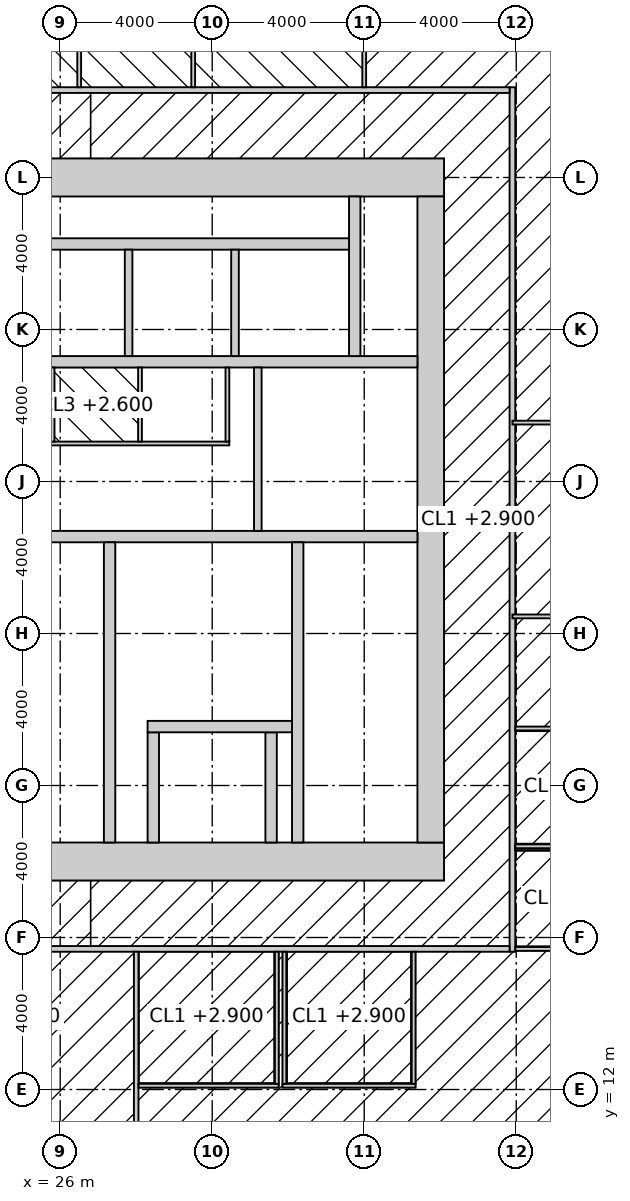
"""IFC4 building model, lengths in metres.
Left out: names, types, materials, properties, quantities, classifications, styles, units other than length and angle.
Written with IfcOpenShell. Run it as: python <this file> out.ifc"""

import sys

from ifc_helpers import new_model, si_unit, direction, frame, frame_2d, origin, place, context, subcontext, project, spatial, rectangle, extrude, element, fill, save


model = new_model("IFC4")
c1 = context("Model", 3, precision=1e-05, world=origin(), true_north=direction((0.0, 1.0)))
c2 = subcontext(c1, "Body", "Model", "MODEL_VIEW")
j1 = project(units=[si_unit("LENGTHUNIT", "METRE"), si_unit("PLANEANGLEUNIT", "RADIAN")], contexts=[c1])
p1 = place(None, origin())
s1 = spatial("IfcSite", under=j1, at=p1, CompositionType="ELEMENT")
p2 = place(p1, origin())
s2 = spatial("IfcBuilding", under=s1, at=p2, CompositionType="ELEMENT")
p3 = place(p2, frame((0.0, 0.0, 179.8)))
s3 = spatial("IfcBuildingStorey", under=s2, at=p3, CompositionType="ELEMENT", Elevation=179.8)
p4 = place(p3, frame((18.5, 18.0, -0.15), z_axis=(0.0, 0.0, 1.0), x_axis=(1.0, 0.0, 0.0)))
e1 = element("IfcWall", 1, at=p4, inside=s3, PredefinedType="SHEAR", context=c2, shape_type="SweptSolid", body=[
    extrude(rectangle(XDim=17.6, YDim=1.0, at=frame_2d((8.8, 0.0))), origin(), (0.0, 0.0, 1.0), 4.0),
])
p5 = place(p4, frame((3.45, 0.0, 0.15)))
e2 = element("IfcOpeningElement", 2, at=p5, cuts=e1, PredefinedType="OPENING", context=c2, shape_type="SweptSolid", body=[
    extrude(rectangle(XDim=1.5, YDim=2.4, at=frame_2d((0.75, 1.2))), frame((0.0, 0.51, 0.0), z_axis=(0.0, -1.0, 0.0), x_axis=(1.0, 0.0, 0.0)), (0.0, 0.0, 1.0), 1.02),
])
p6 = place(p3, frame((18.5, 36.0, -0.15), z_axis=(0.0, 0.0, 1.0), x_axis=(1.0, 0.0, 0.0)))
e3 = element("IfcWall", 3, at=p6, inside=s3, PredefinedType="SHEAR", context=c2, shape_type="SweptSolid", body=[
    extrude(rectangle(XDim=17.6, YDim=1.0, at=frame_2d((8.8, 0.0))), origin(), (0.0, 0.0, 1.0), 4.0),
])
p7 = place(p3, frame((35.75, 18.5, -0.15), z_axis=(0.0, 0.0, 1.0), x_axis=(0.0, 1.0, 0.0)))
e4 = element("IfcWall", 4, at=p7, inside=s3, PredefinedType="SHEAR", context=c2, shape_type="SweptSolid", body=[
    extrude(rectangle(XDim=17.0, YDim=0.7, at=frame_2d((8.5, 0.0))), origin(), (0.0, 0.0, 1.0), 4.0),
])
p8 = place(p7, frame((9.85, 0.0, 0.15)))
e5 = element("IfcOpeningElement", 5, at=p8, cuts=e4, PredefinedType="OPENING", context=c2, shape_type="SweptSolid", body=[
    extrude(rectangle(XDim=1.0, YDim=2.2, at=frame_2d((0.5, 1.1))), frame((0.0, 0.36, 0.0), z_axis=(0.0, -1.0, 0.0), x_axis=(1.0, 0.0, 0.0)), (0.0, 0.0, 1.0), 0.72),
])
p9 = place(p3, frame((24.15, 26.55, -0.15), z_axis=(0.0, 0.0, 1.0), x_axis=(1.0, 0.0, 0.0)))
e6 = element("IfcWall", 6, at=p9, inside=s3, PredefinedType="SHEAR", context=c2, shape_type="SweptSolid", body=[
    extrude(rectangle(XDim=11.25, YDim=0.3, at=frame_2d((5.625, 0.0))), origin(), (0.0, 0.0, 1.0), 4.0),
])
p10 = place(p9, frame((9.25, 0.0, 0.15)))
e7 = element("IfcOpeningElement", 7, at=p10, cuts=e6, PredefinedType="OPENING", context=c2, shape_type="SweptSolid", body=[
    extrude(rectangle(XDim=1.0, YDim=2.2, at=frame_2d((0.5, 1.1))), frame((0.0, 0.16, 0.0), z_axis=(0.0, -1.0, 0.0), x_axis=(1.0, 0.0, 0.0)), (0.0, 0.0, 1.0), 0.32),
])
p11 = place(p9, frame((4.9, 0.0, 0.15)))
e8 = element("IfcOpeningElement", 8, at=p11, cuts=e6, PredefinedType="OPENING", context=c2, shape_type="SweptSolid", body=[
    extrude(rectangle(XDim=1.5, YDim=2.4, at=frame_2d((0.75, 1.2))), frame((0.0, 0.16, 0.0), z_axis=(0.0, -1.0, 0.0), x_axis=(1.0, 0.0, 0.0)), (0.0, 0.0, 1.0), 0.32),
])
p12 = place(p3, frame((27.3, 18.5, -0.15), z_axis=(0.0, 0.0, 1.0), x_axis=(0.0, 1.0, 0.0)))
e9 = element("IfcWall", 9, at=p12, inside=s3, PredefinedType="SHEAR", context=c2, shape_type="SweptSolid", body=[
    extrude(rectangle(XDim=7.9, YDim=0.3, at=frame_2d((3.95, 0.0))), origin(), (0.0, 0.0, 1.0), 4.0),
])
p13 = place(p12, frame((6.4, 0.0, 0.15)))
e10 = element("IfcOpeningElement", 10, at=p13, cuts=e9, PredefinedType="OPENING", context=c2, shape_type="SweptSolid", body=[
    extrude(rectangle(XDim=1.0, YDim=2.2, at=frame_2d((0.5, 1.1))), frame((0.0, 0.16, 0.0), z_axis=(0.0, -1.0, 0.0), x_axis=(1.0, 0.0, 0.0)), (0.0, 0.0, 1.0), 0.32),
])
p14 = place(p3, frame((32.25, 18.5, -0.15), z_axis=(0.0, 0.0, 1.0), x_axis=(0.0, 1.0, 0.0)))
e11 = element("IfcWall", 11, at=p14, inside=s3, PredefinedType="SHEAR", context=c2, shape_type="SweptSolid", body=[
    extrude(rectangle(XDim=7.9, YDim=0.3, at=frame_2d((3.95, 0.0))), origin(), (0.0, 0.0, 1.0), 4.0),
])
for number, where, z_axis, x_axis in (
    (12, (28.45, 18.5, -0.15), (0.0, 0.0, 1.0), (0.0, 1.0, 0.0)),
    (13, (31.55, 18.5, -0.15), (0.0, 0.0, 1.0), (0.0, 1.0, 0.0)),
):
    element("IfcWall", number, at=place(p3, frame(where, z_axis=z_axis, x_axis=x_axis)), inside=s3, PredefinedType="SHEAR", context=c2, shape_type="SweptSolid", body=[
        extrude(rectangle(XDim=2.9, YDim=0.3, at=frame_2d((1.45, 0.0))), origin(), (0.0, 0.0, 1.0), 4.0),
    ])
p15 = place(p3, frame((28.3, 21.55, -0.15), z_axis=(0.0, 0.0, 1.0), x_axis=(1.0, 0.0, 0.0)))
e14 = element("IfcWall", 14, at=p15, inside=s3, PredefinedType="SHEAR", context=c2, shape_type="SweptSolid", body=[
    extrude(rectangle(XDim=3.8, YDim=0.3, at=frame_2d((1.9, 0.0))), origin(), (0.0, 0.0, 1.0), 4.0),
])
p16 = place(p15, frame((1.05, 0.0, 0.15)))
e15 = element("IfcOpeningElement", 15, at=p16, cuts=e14, PredefinedType="OPENING", context=c2, shape_type="SweptSolid", body=[
    extrude(rectangle(XDim=1.3, YDim=2.4, at=frame_2d((0.65, 1.2))), frame((0.0, 0.16, 0.0), z_axis=(0.0, -1.0, 0.0), x_axis=(1.0, 0.0, 0.0)), (0.0, 0.0, 1.0), 0.32),
])
p17 = place(p3, frame((24.15, 31.15, -0.15), z_axis=(0.0, 0.0, 1.0), x_axis=(1.0, 0.0, 0.0)))
e16 = element("IfcWall", 16, at=p17, inside=s3, PredefinedType="SHEAR", context=c2, shape_type="SweptSolid", body=[
    extrude(rectangle(XDim=11.25, YDim=0.3, at=frame_2d((5.625, 0.0))), origin(), (0.0, 0.0, 1.0), 4.0),
])
p18 = place(p17, frame((7.25, 0.0, 0.15)))
e17 = element("IfcOpeningElement", 17, at=p18, cuts=e16, PredefinedType="OPENING", context=c2, shape_type="SweptSolid", body=[
    extrude(rectangle(XDim=1.4, YDim=2.4, at=frame_2d((0.7, 1.2))), frame((0.0, 0.16, 0.0), z_axis=(0.0, -1.0, 0.0), x_axis=(1.0, 0.0, 0.0)), (0.0, 0.0, 1.0), 0.32),
])
p19 = place(p3, frame((33.75, 31.3, -0.15), z_axis=(0.0, 0.0, 1.0), x_axis=(0.0, 1.0, 0.0)))
e18 = element("IfcWall", 18, at=p19, inside=s3, PredefinedType="SHEAR", context=c2, shape_type="SweptSolid", body=[
    extrude(rectangle(XDim=4.2, YDim=0.3, at=frame_2d((2.1, 0.0))), origin(), (0.0, 0.0, 1.0), 4.0),
])
p20 = place(p3, frame((25.0, 34.25, -0.15), z_axis=(0.0, 0.0, 1.0), x_axis=(1.0, 0.0, 0.0)))
e19 = element("IfcWall", 19, at=p20, inside=s3, PredefinedType="SHEAR", context=c2, shape_type="SweptSolid", body=[
    extrude(rectangle(XDim=8.6, YDim=0.3, at=frame_2d((4.3, 0.0))), origin(), (0.0, 0.0, 1.0), 4.0),
])
for number, where, z_axis, x_axis in (
    (20, (27.8, 31.3, -0.15), (0.0, 0.0, 1.0), (0.0, 1.0, 0.0)),
    (21, (30.6, 31.3, -0.15), (0.0, 0.0, 1.0), (0.0, 1.0, 0.0)),
):
    element("IfcWall", number, at=place(p3, frame(where, z_axis=z_axis, x_axis=x_axis)), inside=s3, PredefinedType="SOLIDWALL", context=c2, shape_type="SweptSolid", body=[
        extrude(rectangle(XDim=2.8, YDim=0.2, at=frame_2d((1.4, 0.0))), origin(), (0.0, 0.0, 1.0), 4.0),
    ])
p21 = place(p3, frame((31.2, 26.7, 0.0), z_axis=(0.0, 0.0, 1.0), x_axis=(0.0, 1.0, 0.0)))
e22 = element("IfcWall", 22, at=p21, inside=s3, PredefinedType="SOLIDWALL", context=c2, shape_type="SweptSolid", body=[
    extrude(rectangle(XDim=4.3, YDim=0.2, at=frame_2d((2.15, 0.0))), origin(), (0.0, 0.0, 1.0), 3.85),
])
p22 = place(p3, frame((25.75, 29.0, 0.0), z_axis=(0.0, 0.0, 1.0), x_axis=(1.0, 0.0, 0.0)))
e23 = element("IfcWall", 23, at=p22, inside=s3, PredefinedType="PARTITIONING", context=c2, shape_type="SweptSolid", body=[
    extrude(rectangle(XDim=4.7, YDim=0.1, at=frame_2d((2.35, 0.0))), origin(), (0.0, 0.0, 1.0), 3.85),
])
p23 = place(p22, frame((0.7, 0.0, 0.0)))
e24 = element("IfcOpeningElement", 24, at=p23, cuts=e23, PredefinedType="OPENING", context=c2, shape_type="SweptSolid", body=[
    extrude(rectangle(XDim=1.0, YDim=2.2, at=frame_2d((0.5, 1.1))), frame((0.0, 0.06, 0.0), z_axis=(0.0, -1.0, 0.0), x_axis=(1.0, 0.0, 0.0)), (0.0, 0.0, 1.0), 0.12),
])
p24 = place(p22, frame((3.0, 0.0, 0.0)))
e25 = element("IfcOpeningElement", 25, at=p24, cuts=e23, PredefinedType="OPENING", context=c2, shape_type="SweptSolid", body=[
    extrude(rectangle(XDim=1.0, YDim=2.2, at=frame_2d((0.5, 1.1))), frame((0.0, 0.06, 0.0), z_axis=(0.0, -1.0, 0.0), x_axis=(1.0, 0.0, 0.0)), (0.0, 0.0, 1.0), 0.12),
])
for number, where, z_axis, x_axis in (
    (26, (25.8, 29.05, 0.0), (0.0, 0.0, 1.0), (0.0, 1.0, 0.0)),
    (27, (30.4, 29.05, 0.0), (0.0, 0.0, 1.0), (0.0, 1.0, 0.0)),
    (28, (28.1, 29.05, 0.0), (0.0, 0.0, 1.0), (0.0, 1.0, 0.0)),
):
    element("IfcWall", number, at=place(p3, frame(where, z_axis=z_axis, x_axis=x_axis)), inside=s3, PredefinedType="PARTITIONING", context=c2, shape_type="SweptSolid", body=[
        extrude(rectangle(XDim=1.95, YDim=0.1, at=frame_2d((0.975, 0.0))), origin(), (0.0, 0.0, 1.0), 3.85),
    ])
p25 = place(p3, frame((37.9, 15.625, 0.0), z_axis=(0.0, 0.0, 1.0), x_axis=(0.0, 1.0, 0.0)))
e29 = element("IfcWall", 29, at=p25, inside=s3, PredefinedType="PARTITIONING", context=c2, shape_type="SweptSolid", body=[
    extrude(rectangle(XDim=22.75, YDim=0.15, at=frame_2d((11.375, 0.0))), origin(), (0.0, 0.0, 1.0), 2.95),
])
p26 = place(p25, frame((10.475, 0.0, 0.0)))
e30 = element("IfcOpeningElement", 30, at=p26, cuts=e29, PredefinedType="OPENING", context=c2, shape_type="SweptSolid", body=[
    extrude(rectangle(XDim=1.8, YDim=2.4, at=frame_2d((0.9, 1.2))), frame((0.0, 0.085, 0.0), z_axis=(0.0, -1.0, 0.0), x_axis=(1.0, 0.0, 0.0)), (0.0, 0.0, 1.0), 0.17),
])
p27 = place(p3, frame((15.175, 15.7, 0.0), z_axis=(0.0, 0.0, 1.0), x_axis=(1.0, 0.0, 0.0)))
e31 = element("IfcWall", 31, at=p27, inside=s3, PredefinedType="PARTITIONING", context=c2, shape_type="SweptSolid", body=[
    extrude(rectangle(XDim=22.65, YDim=0.15, at=frame_2d((11.325, 0.0))), origin(), (0.0, 0.0, 1.0), 3.85),
])
p28 = place(p3, frame((15.175, 38.3, 0.0), z_axis=(0.0, 0.0, 1.0), x_axis=(1.0, 0.0, 0.0)))
e32 = element("IfcWall", 32, at=p28, inside=s3, PredefinedType="PARTITIONING", context=c2, shape_type="SweptSolid", body=[
    extrude(rectangle(XDim=22.65, YDim=0.15, at=frame_2d((11.325, 0.0))), origin(), (0.0, 0.0, 1.0), 3.85),
])
p29 = place(p28, frame((8.575, 0.0, 0.0)))
e33 = element("IfcOpeningElement", 33, at=p29, cuts=e32, PredefinedType="OPENING", context=c2, shape_type="SweptSolid", body=[
    extrude(rectangle(XDim=0.9, YDim=2.1, at=frame_2d((0.45, 1.05))), frame((0.0, 0.085, 0.0), z_axis=(0.0, -1.0, 0.0), x_axis=(1.0, 0.0, 0.0)), (0.0, 0.0, 1.0), 0.17),
])
p30 = place(p28, frame((12.325, 0.0, 0.0)))
e34 = element("IfcOpeningElement", 34, at=p30, cuts=e32, PredefinedType="OPENING", context=c2, shape_type="SweptSolid", body=[
    extrude(rectangle(XDim=1.0, YDim=2.1, at=frame_2d((0.5, 1.05))), frame((0.0, 0.085, 0.0), z_axis=(0.0, -1.0, 0.0), x_axis=(1.0, 0.0, 0.0)), (0.0, 0.0, 1.0), 0.17),
])
p31 = place(p28, frame((16.175, 0.0, 0.0)))
e35 = element("IfcOpeningElement", 35, at=p31, cuts=e32, PredefinedType="OPENING", context=c2, shape_type="SweptSolid", body=[
    extrude(rectangle(XDim=0.9, YDim=2.1, at=frame_2d((0.45, 1.05))), frame((0.0, 0.085, 0.0), z_axis=(0.0, -1.0, 0.0), x_axis=(1.0, 0.0, 0.0)), (0.0, 0.0, 1.0), 0.17),
])
p32 = place(p3, frame((34.0, 38.375, 0.0), z_axis=(0.0, 0.0, 1.0), x_axis=(0.0, 1.0, 0.0)))
e36 = element("IfcWall", 36, at=p32, inside=s3, PredefinedType="PARTITIONING", context=c2, shape_type="SweptSolid", body=[
    extrude(rectangle(XDim=3.675, YDim=0.1, at=frame_2d((1.837, 0.0))), origin(), (0.0, 0.0, 1.0), 2.95),
])
for number, where, z_axis, x_axis in (
    (37, (26.5, 38.375, 0.0), (0.0, 0.0, 1.0), (0.0, 1.0, 0.0)),
    (38, (29.5, 38.375, 0.0), (0.0, 0.0, 1.0), (0.0, 1.0, 0.0)),
):
    element("IfcWall", number, at=place(p3, frame(where, z_axis=z_axis, x_axis=x_axis)), inside=s3, PredefinedType="PARTITIONING", context=c2, shape_type="SweptSolid", body=[
        extrude(rectangle(XDim=3.575, YDim=0.1, at=frame_2d((1.788, 0.0))), origin(), (0.0, 0.0, 1.0), 3.85),
    ])
p33 = place(p3, frame((28.0, 8.3, 0.0), z_axis=(0.0, 0.0, 1.0), x_axis=(0.0, 1.0, 0.0)))
e39 = element("IfcWall", 39, at=p33, inside=s3, PredefinedType="PARTITIONING", context=c2, shape_type="SweptSolid", body=[
    extrude(rectangle(XDim=7.325, YDim=0.12, at=frame_2d((3.663, 0.0))), origin(), (0.0, 0.0, 1.0), 3.85),
])
p34 = place(p3, frame((28.06, 12.1, 0.0), z_axis=(0.0, 0.0, 1.0), x_axis=(1.0, 0.0, 0.0)))
e40 = element("IfcWall", 40, at=p34, inside=s3, PredefinedType="PARTITIONING", context=c2, shape_type="SweptSolid", body=[
    extrude(rectangle(XDim=3.69, YDim=0.1, at=frame_2d((1.845, 0.0))), origin(), (0.0, 0.0, 1.0), 3.85),
])
p35 = place(p34, frame((1.29, 0.0, 0.0)))
e41 = element("IfcOpeningElement", 41, at=p35, cuts=e40, PredefinedType="OPENING", context=c2, shape_type="SweptSolid", body=[
    extrude(rectangle(XDim=1.0, YDim=2.2, at=frame_2d((0.5, 1.1))), frame((0.0, 0.06, 0.0), z_axis=(0.0, -1.0, 0.0), x_axis=(1.0, 0.0, 0.0)), (0.0, 0.0, 1.0), 0.12),
])
p36 = place(p3, frame((31.85, 12.1, 0.0), z_axis=(0.0, 0.0, 1.0), x_axis=(1.0, 0.0, 0.0)))
e42 = element("IfcWall", 42, at=p36, inside=s3, PredefinedType="PARTITIONING", context=c2, shape_type="SweptSolid", body=[
    extrude(rectangle(XDim=3.5, YDim=0.1, at=frame_2d((1.75, 0.0))), origin(), (0.0, 0.0, 1.0), 3.85),
])
p37 = place(p36, frame((1.25, 0.0, 0.0)))
e43 = element("IfcOpeningElement", 43, at=p37, cuts=e42, PredefinedType="OPENING", context=c2, shape_type="SweptSolid", body=[
    extrude(rectangle(XDim=1.0, YDim=2.2, at=frame_2d((0.5, 1.1))), frame((0.0, 0.06, 0.0), z_axis=(0.0, -1.0, 0.0), x_axis=(1.0, 0.0, 0.0)), (0.0, 0.0, 1.0), 0.12),
])
for number, where, z_axis, x_axis in (
    (44, (37.975, 15.7, 0.0), (0.0, 0.0, 1.0), (1.0, 0.0, 0.0)),
    (45, (37.975, 18.35, 0.0), (0.0, 0.0, 1.0), (1.0, 0.0, 0.0)),
    (46, (37.975, 18.4, 0.0), (0.0, 0.0, 1.0), (1.0, 0.0, 0.0)),
    (47, (37.975, 21.5, 0.0), (0.0, 0.0, 1.0), (1.0, 0.0, 0.0)),
):
    element("IfcWall", number, at=place(p3, frame(where, z_axis=z_axis, x_axis=x_axis)), inside=s3, PredefinedType="PARTITIONING", context=c2, shape_type="SweptSolid", body=[
        extrude(rectangle(XDim=3.575, YDim=0.1, at=frame_2d((1.788, 0.0))), origin(), (0.0, 0.0, 1.0), 3.85),
    ])
for number, where, z_axis, x_axis in (
    (48, (31.7, 12.15, 0.0), (0.0, 0.0, 1.0), (0.0, 1.0, 0.0)),
    (49, (31.9, 12.15, 0.0), (0.0, 0.0, 1.0), (0.0, 1.0, 0.0)),
    (50, (35.3, 12.15, 0.0), (0.0, 0.0, 1.0), (0.0, 1.0, 0.0)),
):
    element("IfcWall", number, at=place(p3, frame(where, z_axis=z_axis, x_axis=x_axis)), inside=s3, PredefinedType="PARTITIONING", context=c2, shape_type="SweptSolid", body=[
        extrude(rectangle(XDim=3.475, YDim=0.1, at=frame_2d((1.738, 0.0))), origin(), (0.0, 0.0, 1.0), 3.85),
    ])
for number, where, z_axis, x_axis in (
    (51, (37.9, 24.45, 0.0), (0.0, 0.0, 1.0), (1.0, 0.0, 0.0)),
    (52, (42.4, 29.55, 0.0), (0.0, 0.0, 1.0), (-1.0, 0.0, 0.0)),
):
    element("IfcWall", number, at=place(p3, frame(where, z_axis=z_axis, x_axis=x_axis)), inside=s3, PredefinedType="PARTITIONING", context=c2, shape_type="SweptSolid", body=[
        extrude(rectangle(XDim=4.5, YDim=0.1, at=frame_2d((2.25, 0.0))), origin(), (0.0, 0.0, 1.0), 3.85),
    ])
p38 = place(p13, origin())
e53 = element("IfcDoor", 53, at=p38, inside=s3, OperationType="SINGLE_SWING_RIGHT", PredefinedType="DOOR", context=c2, shape_type="SweptSolid", body=[
    extrude(rectangle(XDim=1.0, YDim=2.2, at=frame_2d((0.5, 1.1))), frame((0.0, 0.025, 0.0), z_axis=(0.0, -1.0, 0.0), x_axis=(1.0, 0.0, 0.0)), (0.0, 0.0, 1.0), 0.05),
])
fill(e10, e53)
p39 = place(p10, frame((1.0, 0.0, 0.0), z_axis=(0.0, 0.0, 1.0), x_axis=(-1.0, 0.0, 0.0)))
e54 = element("IfcDoor", 54, at=p39, inside=s3, OperationType="SINGLE_SWING_RIGHT", PredefinedType="DOOR", context=c2, shape_type="SweptSolid", body=[
    extrude(rectangle(XDim=1.0, YDim=2.2, at=frame_2d((0.5, 1.1))), frame((0.0, 0.025, 0.0), z_axis=(0.0, -1.0, 0.0), x_axis=(1.0, 0.0, 0.0)), (0.0, 0.0, 1.0), 0.05),
])
fill(e7, e54)
p40 = place(p8, origin())
e55 = element("IfcDoor", 55, at=p40, inside=s3, OperationType="SINGLE_SWING_RIGHT", PredefinedType="DOOR", context=c2, shape_type="SweptSolid", body=[
    extrude(rectangle(XDim=1.0, YDim=2.2, at=frame_2d((0.5, 1.1))), frame((0.0, 0.025, 0.0), z_axis=(0.0, -1.0, 0.0), x_axis=(1.0, 0.0, 0.0)), (0.0, 0.0, 1.0), 0.05),
])
fill(e5, e55)
p41 = place(p11, origin())
e56 = element("IfcDoor", 56, at=p41, inside=s3, OperationType="DOUBLE_DOOR_DOUBLE_SWING", PredefinedType="DOOR", context=c2, shape_type="SweptSolid", body=[
    extrude(rectangle(XDim=1.5, YDim=2.4, at=frame_2d((0.75, 1.2))), frame((0.0, 0.025, 0.0), z_axis=(0.0, -1.0, 0.0), x_axis=(1.0, 0.0, 0.0)), (0.0, 0.0, 1.0), 0.05),
])
fill(e8, e56)
p42 = place(p23, origin())
e57 = element("IfcDoor", 57, at=p42, inside=s3, OperationType="SINGLE_SWING_LEFT", PredefinedType="DOOR", context=c2, shape_type="SweptSolid", body=[
    extrude(rectangle(XDim=1.0, YDim=2.2, at=frame_2d((0.5, 1.1))), frame((0.0, 0.025, 0.0), z_axis=(0.0, -1.0, 0.0), x_axis=(1.0, 0.0, 0.0)), (0.0, 0.0, 1.0), 0.05),
])
fill(e24, e57)
p43 = place(p24, origin())
e58 = element("IfcDoor", 58, at=p43, inside=s3, OperationType="SINGLE_SWING_LEFT", PredefinedType="DOOR", context=c2, shape_type="SweptSolid", body=[
    extrude(rectangle(XDim=1.0, YDim=2.2, at=frame_2d((0.5, 1.1))), frame((0.0, 0.025, 0.0), z_axis=(0.0, -1.0, 0.0), x_axis=(1.0, 0.0, 0.0)), (0.0, 0.0, 1.0), 0.05),
])
fill(e25, e58)
p44 = place(p30, origin())
e59 = element("IfcDoor", 59, at=p44, inside=s3, OperationType="SLIDING_TO_LEFT", PredefinedType="DOOR", context=c2, shape_type="SweptSolid", body=[
    extrude(rectangle(XDim=1.0, YDim=2.1, at=frame_2d((0.5, 1.05))), frame((0.0, 0.025, 0.0), z_axis=(0.0, -1.0, 0.0), x_axis=(1.0, 0.0, 0.0)), (0.0, 0.0, 1.0), 0.05),
])
fill(e34, e59)
p45 = place(p31, origin())
e60 = element("IfcDoor", 60, at=p45, inside=s3, OperationType="SINGLE_SWING_LEFT", PredefinedType="DOOR", context=c2, shape_type="SweptSolid", body=[
    extrude(rectangle(XDim=0.9, YDim=2.1, at=frame_2d((0.45, 1.05))), frame((0.0, 0.025, 0.0), z_axis=(0.0, -1.0, 0.0), x_axis=(1.0, 0.0, 0.0)), (0.0, 0.0, 1.0), 0.05),
])
fill(e35, e60)
p46 = place(p26, origin())
e61 = element("IfcDoor", 61, at=p46, inside=s3, OperationType="DOUBLE_DOOR_DOUBLE_SWING", PredefinedType="DOOR", context=c2, shape_type="SweptSolid", body=[
    extrude(rectangle(XDim=1.8, YDim=2.4, at=frame_2d((0.9, 1.2))), frame((0.0, 0.025, 0.0), z_axis=(0.0, -1.0, 0.0), x_axis=(1.0, 0.0, 0.0)), (0.0, 0.0, 1.0), 0.05),
])
fill(e30, e61)
p47 = place(p35, origin())
e62 = element("IfcDoor", 62, at=p47, inside=s3, OperationType="SINGLE_SWING_RIGHT", PredefinedType="DOOR", context=c2, shape_type="SweptSolid", body=[
    extrude(rectangle(XDim=1.0, YDim=2.2, at=frame_2d((0.5, 1.1))), frame((0.0, 0.025, 0.0), z_axis=(0.0, -1.0, 0.0), x_axis=(1.0, 0.0, 0.0)), (0.0, 0.0, 1.0), 0.05),
])
fill(e41, e62)
p48 = place(p37, origin())
e63 = element("IfcDoor", 63, at=p48, inside=s3, OperationType="SINGLE_SWING_LEFT", PredefinedType="DOOR", context=c2, shape_type="SweptSolid", body=[
    extrude(rectangle(XDim=1.0, YDim=2.2, at=frame_2d((0.5, 1.1))), frame((0.0, 0.025, 0.0), z_axis=(0.0, -1.0, 0.0), x_axis=(1.0, 0.0, 0.0)), (0.0, 0.0, 1.0), 0.05),
])
fill(e43, e63)
p49 = place(p16, origin())
e64 = element("IfcDoor", 64, at=p49, inside=s3, OperationType="DOUBLE_DOOR_SLIDING", PredefinedType="DOOR", context=c2, shape_type="SweptSolid", body=[
    extrude(rectangle(XDim=1.3, YDim=2.4, at=frame_2d((0.65, 1.2))), frame((0.0, 0.025, 0.0), z_axis=(0.0, -1.0, 0.0), x_axis=(1.0, 0.0, 0.0)), (0.0, 0.0, 1.0), 0.05),
])
fill(e15, e64)
p50 = place(p18, origin())
e65 = element("IfcDoor", 65, at=p50, inside=s3, OperationType="DOUBLE_DOOR_SLIDING", PredefinedType="DOOR", context=c2, shape_type="SweptSolid", body=[
    extrude(rectangle(XDim=1.4, YDim=2.4, at=frame_2d((0.7, 1.2))), frame((0.0, 0.025, 0.0), z_axis=(0.0, -1.0, 0.0), x_axis=(1.0, 0.0, 0.0)), (0.0, 0.0, 1.0), 0.05),
])
fill(e17, e65)
save(model, sys.argv[1])
